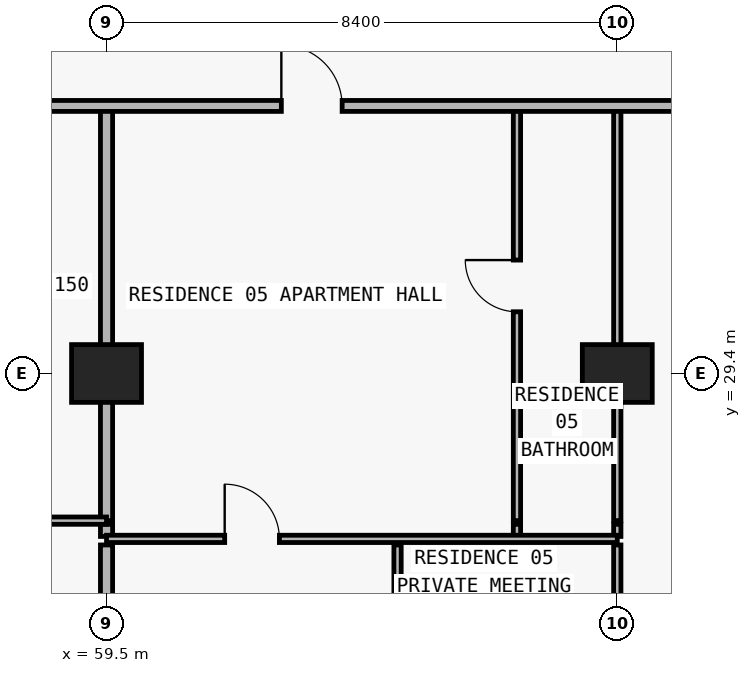
"""IFC4 building model, lengths in metres.
Left out: names, types, materials, properties, quantities, classifications, styles, units other than length and angle.
Written with IfcOpenShell. Run it as: python <this file> out.ifc"""

import sys

from ifc_helpers import new_model, si_unit, direction, frame, frame_2d, origin, origin_2d, place, context, subcontext, project, spatial, rectangle, extrude, element, fill, save


model = new_model("IFC4")
c1 = context("Model", 3, precision=1e-05, world=origin(), true_north=direction((0.0, 1.0)))
c2 = subcontext(c1, "Body", "Model", "MODEL_VIEW")
j1 = project(units=[si_unit("LENGTHUNIT", "METRE"), si_unit("PLANEANGLEUNIT", "RADIAN")], contexts=[c1])
p1 = place(None, origin())
s1 = spatial("IfcSite", under=j1, at=p1, CompositionType="ELEMENT")
p2 = place(p1, origin())
s2 = spatial("IfcBuilding", under=s1, at=p2, CompositionType="ELEMENT")
p3 = place(p2, frame((0.0, 0.0, 59.7)))
s3 = spatial("IfcBuildingStorey", under=s2, at=p3, CompositionType="ELEMENT", Elevation=59.7)
for number, where, z_axis, x_axis in (
    (1, (59.5, 29.4, 0.0), (0.0, 0.0, 1.0), (1.0, 0.0, 0.0)),
    (2, (67.9, 29.4, 0.0), (0.0, 0.0, 1.0), (1.0, 0.0, 0.0)),
):
    element("IfcColumn", number, at=place(p3, frame(where, z_axis=z_axis, x_axis=x_axis)), inside=s3, PredefinedType="COLUMN", context=c2, shape_type="SweptSolid", body=[
        extrude(rectangle(XDim=1.15, YDim=0.95, at=origin_2d()), origin(), (0.0, 0.0, 1.0), 3.05),
    ])
p4 = place(p3, frame((59.5, 22.2, 0.0), z_axis=(0.0, 0.0, 1.0), x_axis=(0.0, 1.0, 0.0)))
e3 = element("IfcWall", 3, at=p4, inside=s3, PredefinedType="PARTITIONING", context=c2, shape_type="SweptSolid", body=[
    extrude(rectangle(XDim=4.38, YDim=0.2, at=frame_2d((2.19, 0.0))), origin(), (0.0, 0.0, 1.0), 2.11),
])
p5 = place(p3, frame((59.5, 26.72, 0.0), z_axis=(0.0, 0.0, 1.0), x_axis=(0.0, 1.0, 0.0)))
e4 = element("IfcWall", 4, at=p5, inside=s3, PredefinedType="PARTITIONING", context=c2, shape_type="SweptSolid", body=[
    extrude(rectangle(XDim=0.2, YDim=0.2, at=frame_2d((0.1, 0.0))), origin(), (0.0, 0.0, 1.0), 2.11),
])
p6 = place(p3, frame((59.5, 26.98, 0.0), z_axis=(0.0, 0.0, 1.0), x_axis=(0.0, 1.0, 0.0)))
e5 = element("IfcWall", 5, at=p6, inside=s3, PredefinedType="PARTITIONING", context=c2, shape_type="SweptSolid", body=[
    extrude(rectangle(XDim=6.82, YDim=0.2, at=frame_2d((3.41, 0.0))), origin(), (0.0, 0.0, 1.0), 2.11),
])
p7 = place(p3, frame((64.286, 22.2, 0.0), z_axis=(0.0, 0.0, 1.0), x_axis=(0.0, 1.0, 0.0)))
e6 = element("IfcWall", 6, at=p7, inside=s3, PredefinedType="PARTITIONING", context=c2, shape_type="SweptSolid", body=[
    extrude(rectangle(XDim=4.38, YDim=0.12, at=frame_2d((2.19, 0.0))), origin(), (0.0, 0.0, 1.0), 3.05),
])
p8 = place(p7, frame((1.74, 0.0, 0.0)))
e7 = element("IfcOpeningElement", 7, at=p8, cuts=e6, PredefinedType="OPENING", context=c2, shape_type="SweptSolid", body=[
    extrude(rectangle(XDim=0.9, YDim=2.15, at=frame_2d((0.45, 1.075))), frame((0.0, 0.07, 0.0), z_axis=(0.0, -1.0, 0.0), x_axis=(1.0, 0.0, 0.0)), (0.0, 0.0, 1.0), 0.14),
])
p9 = place(p3, frame((66.25, 26.72, 0.0), z_axis=(0.0, 0.0, 1.0), x_axis=(0.0, 1.0, 0.0)))
e8 = element("IfcWall", 8, at=p9, inside=s3, PredefinedType="PARTITIONING", context=c2, shape_type="SweptSolid", body=[
    extrude(rectangle(XDim=0.2, YDim=0.12, at=frame_2d((0.1, 0.0))), origin(), (0.0, 0.0, 1.0), 3.05),
])
p10 = place(p3, frame((66.25, 26.98, 0.0), z_axis=(0.0, 0.0, 1.0), x_axis=(0.0, 1.0, 0.0)))
e9 = element("IfcWall", 9, at=p10, inside=s3, PredefinedType="PARTITIONING", context=c2, shape_type="SweptSolid", body=[
    extrude(rectangle(XDim=6.82, YDim=0.12, at=frame_2d((3.41, 0.0))), origin(), (0.0, 0.0, 1.0), 3.05),
])
p11 = place(p10, frame((3.435, 0.0, 0.0)))
e10 = element("IfcOpeningElement", 10, at=p11, cuts=e9, PredefinedType="OPENING", context=c2, shape_type="SweptSolid", body=[
    extrude(rectangle(XDim=0.85, YDim=2.1, at=frame_2d((0.425, 1.05))), frame((0.0, 0.07, 0.0), z_axis=(0.0, -1.0, 0.0), x_axis=(1.0, 0.0, 0.0)), (0.0, 0.0, 1.0), 0.14),
])
p12 = place(p3, frame((67.9, 22.2, 0.0), z_axis=(0.0, 0.0, 1.0), x_axis=(0.0, 1.0, 0.0)))
e11 = element("IfcWall", 11, at=p12, inside=s3, PredefinedType="PARTITIONING", context=c2, shape_type="SweptSolid", body=[
    extrude(rectangle(XDim=4.38, YDim=0.12, at=frame_2d((2.19, 0.0))), origin(), (0.0, 0.0, 1.0), 2.11),
])
p13 = place(p12, frame((1.74, 0.0, 0.0)))
e12 = element("IfcOpeningElement", 12, at=p13, cuts=e11, PredefinedType="OPENING", context=c2, shape_type="SweptSolid", body=[
    extrude(rectangle(XDim=0.9, YDim=2.06, at=frame_2d((0.45, 1.03))), frame((0.0, 0.07, 0.0), z_axis=(0.0, -1.0, 0.0), x_axis=(1.0, 0.0, 0.0)), (0.0, 0.0, 1.0), 0.14),
])
p14 = place(p3, frame((67.9, 26.72, 0.0), z_axis=(0.0, 0.0, 1.0), x_axis=(0.0, 1.0, 0.0)))
e13 = element("IfcWall", 13, at=p14, inside=s3, PredefinedType="PARTITIONING", context=c2, shape_type="SweptSolid", body=[
    extrude(rectangle(XDim=0.2, YDim=0.12, at=frame_2d((0.1, 0.0))), origin(), (0.0, 0.0, 1.0), 2.11),
])
p15 = place(p3, frame((67.9, 26.98, 0.0), z_axis=(0.0, 0.0, 1.0), x_axis=(0.0, 1.0, 0.0)))
e14 = element("IfcWall", 14, at=p15, inside=s3, PredefinedType="PARTITIONING", context=c2, shape_type="SweptSolid", body=[
    extrude(rectangle(XDim=6.82, YDim=0.12, at=frame_2d((3.41, 0.0))), origin(), (0.0, 0.0, 1.0), 2.11),
])
p16 = place(p3, frame((59.5, 26.68, 0.0), z_axis=(0.0, 0.0, 1.0), x_axis=(1.0, 0.0, 0.0)))
e15 = element("IfcWall", 15, at=p16, inside=s3, PredefinedType="PARTITIONING", context=c2, shape_type="SweptSolid", body=[
    extrude(rectangle(XDim=8.4, YDim=0.12, at=frame_2d((4.2, 0.0))), origin(), (0.0, 0.0, 1.0), 3.05),
])
p17 = place(p16, frame((1.943, 0.0, 0.0)))
e16 = element("IfcOpeningElement", 16, at=p17, cuts=e15, PredefinedType="OPENING", context=c2, shape_type="SweptSolid", body=[
    extrude(rectangle(XDim=0.9, YDim=2.15, at=frame_2d((0.45, 1.075))), frame((0.0, 0.07, 0.0), z_axis=(0.0, -1.0, 0.0), x_axis=(1.0, 0.0, 0.0)), (0.0, 0.0, 1.0), 0.14),
])
p18 = place(p3, frame((51.37, 26.98, 0.0), z_axis=(0.0, 0.0, 1.0), x_axis=(1.0, 0.0, 0.0)))
e17 = element("IfcWall", 17, at=p18, inside=s3, PredefinedType="PARTITIONING", context=c2, shape_type="SweptSolid", body=[
    extrude(rectangle(XDim=8.13, YDim=0.12, at=frame_2d((4.065, 0.0))), origin(), (0.0, 0.0, 1.0), 3.05),
])
p19 = place(p18, frame((1.683, 0.0, 0.0)))
e18 = element("IfcOpeningElement", 18, at=p19, cuts=e17, PredefinedType="OPENING", context=c2, shape_type="SweptSolid", body=[
    extrude(rectangle(XDim=0.9, YDim=2.15, at=frame_2d((0.45, 1.075))), frame((0.0, 0.07, 0.0), z_axis=(0.0, -1.0, 0.0), x_axis=(1.0, 0.0, 0.0)), (0.0, 0.0, 1.0), 0.14),
])
p20 = place(p3, frame((5.105, 33.8, 0.0), z_axis=(0.0, 0.0, 1.0), x_axis=(1.0, 0.0, 0.0)))
e19 = element("IfcWall", 19, at=p20, inside=s3, PredefinedType="PARTITIONING", context=c2, shape_type="SweptSolid", body=[
    extrude(rectangle(XDim=67.595, YDim=0.18, at=frame_2d((33.797, 0.0))), origin(), (0.0, 0.0, 1.0), 3.05),
])
p21 = place(p20, frame((7.745, 0.0, 0.0)))
e20 = element("IfcOpeningElement", 20, at=p21, cuts=e19, PredefinedType="OPENING", context=c2, shape_type="SweptSolid", body=[
    extrude(rectangle(XDim=1.0, YDim=2.2, at=frame_2d((0.5, 1.1))), frame((0.0, 0.1, 0.0), z_axis=(0.0, -1.0, 0.0), x_axis=(1.0, 0.0, 0.0)), (0.0, 0.0, 1.0), 0.2),
])
p22 = place(p20, frame((24.545, 0.0, 0.0)))
e21 = element("IfcOpeningElement", 21, at=p22, cuts=e19, PredefinedType="OPENING", context=c2, shape_type="SweptSolid", body=[
    extrude(rectangle(XDim=1.0, YDim=2.2, at=frame_2d((0.5, 1.1))), frame((0.0, 0.1, 0.0), z_axis=(0.0, -1.0, 0.0), x_axis=(1.0, 0.0, 0.0)), (0.0, 0.0, 1.0), 0.2),
])
p23 = place(p20, frame((40.47, 0.0, 0.0)))
e22 = element("IfcOpeningElement", 22, at=p23, cuts=e19, PredefinedType="OPENING", context=c2, shape_type="SweptSolid", body=[
    extrude(rectangle(XDim=1.0, YDim=2.2, at=frame_2d((0.5, 1.1))), frame((0.0, 0.1, 0.0), z_axis=(0.0, -1.0, 0.0), x_axis=(1.0, 0.0, 0.0)), (0.0, 0.0, 1.0), 0.2),
])
p24 = place(p20, frame((48.87, 0.0, 0.0)))
e23 = element("IfcOpeningElement", 23, at=p24, cuts=e19, PredefinedType="OPENING", context=c2, shape_type="SweptSolid", body=[
    extrude(rectangle(XDim=1.0, YDim=2.2, at=frame_2d((0.5, 1.1))), frame((0.0, 0.1, 0.0), z_axis=(0.0, -1.0, 0.0), x_axis=(1.0, 0.0, 0.0)), (0.0, 0.0, 1.0), 0.2),
])
p25 = place(p20, frame((57.27, 0.0, 0.0)))
e24 = element("IfcOpeningElement", 24, at=p25, cuts=e19, PredefinedType="OPENING", context=c2, shape_type="SweptSolid", body=[
    extrude(rectangle(XDim=1.0, YDim=2.2, at=frame_2d((0.5, 1.1))), frame((0.0, 0.1, 0.0), z_axis=(0.0, -1.0, 0.0), x_axis=(1.0, 0.0, 0.0)), (0.0, 0.0, 1.0), 0.2),
])
p26 = place(p25, origin())
e25 = element("IfcDoor", 25, at=p26, inside=s3, OperationType="SINGLE_SWING_LEFT", PredefinedType="DOOR", context=c2, shape_type="SweptSolid", body=[
    extrude(rectangle(XDim=1.0, YDim=2.2, at=frame_2d((0.5, 1.1))), frame((0.0, 0.025, 0.0), z_axis=(0.0, -1.0, 0.0), x_axis=(1.0, 0.0, 0.0)), (0.0, 0.0, 1.0), 0.05),
])
fill(e24, e25)
p27 = place(p11, origin())
e26 = element("IfcDoor", 26, at=p27, inside=s3, OperationType="SINGLE_SWING_RIGHT", PredefinedType="DOOR", context=c2, shape_type="SweptSolid", body=[
    extrude(rectangle(XDim=0.85, YDim=2.1, at=frame_2d((0.425, 1.05))), frame((0.0, 0.025, 0.0), z_axis=(0.0, -1.0, 0.0), x_axis=(1.0, 0.0, 0.0)), (0.0, 0.0, 1.0), 0.05),
])
fill(e10, e26)
p28 = place(p17, origin())
e27 = element("IfcDoor", 27, at=p28, inside=s3, OperationType="SINGLE_SWING_LEFT", PredefinedType="DOOR", context=c2, shape_type="SweptSolid", body=[
    extrude(rectangle(XDim=0.9, YDim=2.15, at=frame_2d((0.45, 1.075))), frame((0.0, 0.025, 0.0), z_axis=(0.0, -1.0, 0.0), x_axis=(1.0, 0.0, 0.0)), (0.0, 0.0, 1.0), 0.05),
])
fill(e16, e27)
save(model, sys.argv[1])
